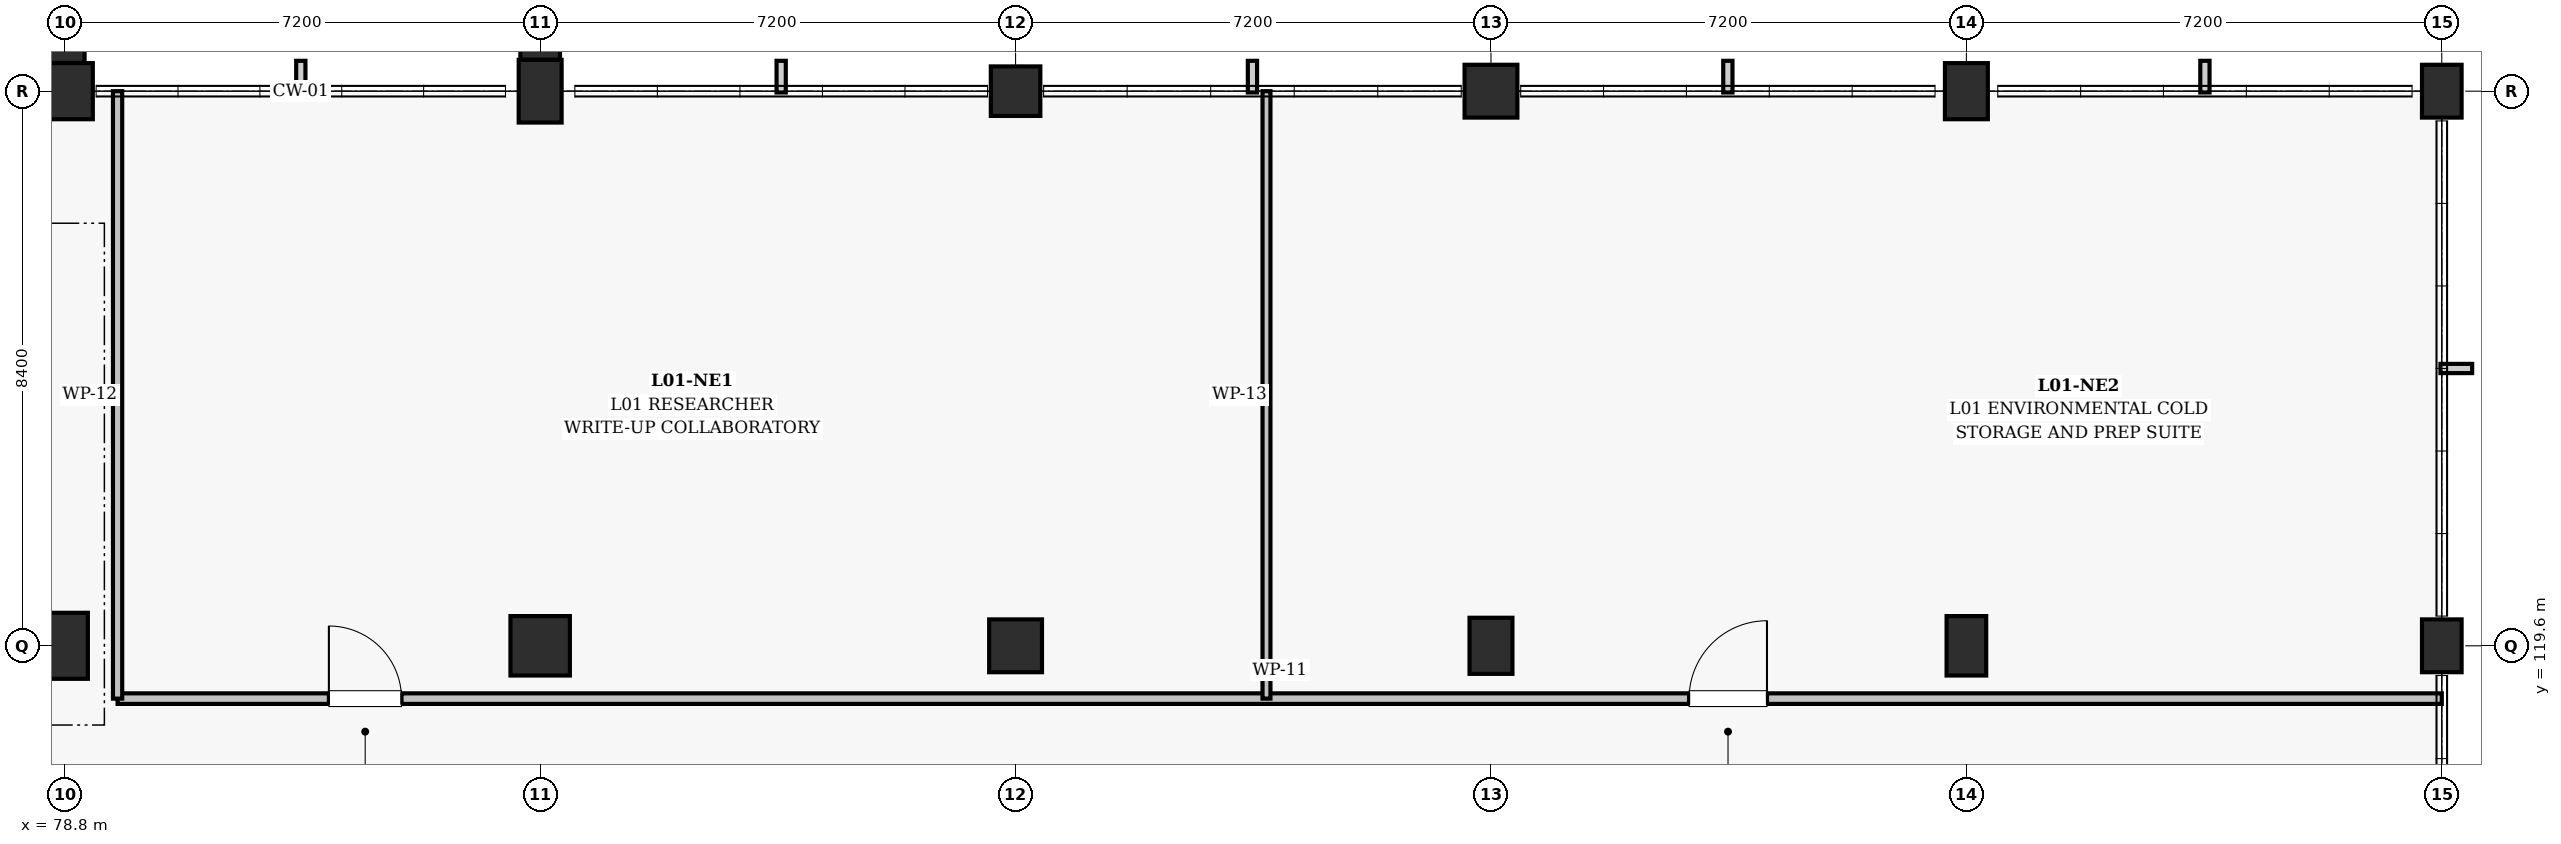
"""IFC4 building model, lengths in metres.
Left out: names, types, materials, properties, quantities, classifications, styles, units other than length and angle.
Written with IfcOpenShell. Run it as: python <this file> out.ifc"""

import sys

from ifc_helpers import new_model, si_unit, direction, frame, frame_2d, origin, origin_2d, place, context, subcontext, project, spatial, rectangle, extrude, element, fill, save


model = new_model("IFC4")
c1 = context("Model", 3, precision=1e-05, world=origin(), true_north=direction((0.0, 1.0)))
c2 = subcontext(c1, "Body", "Model", "MODEL_VIEW")
j1 = project(units=[si_unit("LENGTHUNIT", "METRE"), si_unit("PLANEANGLEUNIT", "RADIAN")], contexts=[c1])
p1 = place(None, origin())
s1 = spatial("IfcSite", under=j1, at=p1, CompositionType="ELEMENT")
p2 = place(p1, origin())
s2 = spatial("IfcBuilding", under=s1, at=p2, CompositionType="ELEMENT")
p3 = place(p2, frame((0.0, 0.0, 5.4)))
s3 = spatial("IfcBuildingStorey", under=s2, at=p3, CompositionType="ELEMENT", Elevation=5.4)
p4 = place(p3, frame((78.8, 119.6, 0.0), z_axis=(0.0, 0.0, 1.0), x_axis=(1.0, 0.0, 0.0)))
e1 = element("IfcColumn", 1, at=p4, inside=s3, PredefinedType="COLUMN", context=c2, shape_type="SweptSolid", body=[
    extrude(rectangle(XDim=0.7, YDim=1.0, at=origin_2d()), origin(), (0.0, 0.0, 1.0), 4.5),
])
p5 = place(p3, frame((78.8, 128.0, 0.0), z_axis=(0.0, 0.0, 1.0), x_axis=(1.0, 0.0, 0.0)))
e2 = element("IfcColumn", 2, at=p5, inside=s3, PredefinedType="COLUMN", context=c2, shape_type="SweptSolid", body=[
    extrude(rectangle(XDim=0.85, YDim=0.85, at=origin_2d()), origin(), (0.0, 0.0, 1.0), 4.5),
])
p6 = place(p3, frame((86.0, 119.6, 0.0), z_axis=(0.0, 0.0, 1.0), x_axis=(1.0, 0.0, 0.0)))
e3 = element("IfcColumn", 3, at=p6, inside=s3, PredefinedType="COLUMN", context=c2, shape_type="SweptSolid", body=[
    extrude(rectangle(XDim=0.9, YDim=0.9, at=origin_2d()), origin(), (0.0, 0.0, 1.0), 4.5),
])
p7 = place(p3, frame((86.0, 128.0, 0.0), z_axis=(0.0, 0.0, 1.0), x_axis=(1.0, 0.0, 0.0)))
e4 = element("IfcColumn", 4, at=p7, inside=s3, PredefinedType="COLUMN", context=c2, shape_type="SweptSolid", body=[
    extrude(rectangle(XDim=0.65, YDim=0.95, at=origin_2d()), origin(), (0.0, 0.0, 1.0), 4.5),
])
p8 = place(p3, frame((93.2, 119.6, 0.0), z_axis=(0.0, 0.0, 1.0), x_axis=(1.0, 0.0, 0.0)))
e5 = element("IfcColumn", 5, at=p8, inside=s3, PredefinedType="COLUMN", context=c2, shape_type="SweptSolid", body=[
    extrude(rectangle(XDim=0.8, YDim=0.8, at=origin_2d()), origin(), (0.0, 0.0, 1.0), 4.5),
])
p9 = place(p3, frame((93.2, 128.0, 0.0), z_axis=(0.0, 0.0, 1.0), x_axis=(1.0, 0.0, 0.0)))
e6 = element("IfcColumn", 6, at=p9, inside=s3, PredefinedType="COLUMN", context=c2, shape_type="SweptSolid", body=[
    extrude(rectangle(XDim=0.75, YDim=0.75, at=origin_2d()), origin(), (0.0, 0.0, 1.0), 4.5),
])
p10 = place(p3, frame((100.4, 119.6, 0.0), z_axis=(0.0, 0.0, 1.0), x_axis=(1.0, 0.0, 0.0)))
e7 = element("IfcColumn", 7, at=p10, inside=s3, PredefinedType="COLUMN", context=c2, shape_type="SweptSolid", body=[
    extrude(rectangle(XDim=0.65, YDim=0.85, at=origin_2d()), origin(), (0.0, 0.0, 1.0), 4.5),
])
p11 = place(p3, frame((100.4, 128.0, 0.0), z_axis=(0.0, 0.0, 1.0), x_axis=(1.0, 0.0, 0.0)))
e8 = element("IfcColumn", 8, at=p11, inside=s3, PredefinedType="COLUMN", context=c2, shape_type="SweptSolid", body=[
    extrude(rectangle(XDim=0.8, YDim=0.8, at=origin_2d()), origin(), (0.0, 0.0, 1.0), 4.5),
])
p12 = place(p3, frame((107.6, 119.6, 0.0), z_axis=(0.0, 0.0, 1.0), x_axis=(1.0, 0.0, 0.0)))
e9 = element("IfcColumn", 9, at=p12, inside=s3, PredefinedType="COLUMN", context=c2, shape_type="SweptSolid", body=[
    extrude(rectangle(XDim=0.6, YDim=0.9, at=origin_2d()), origin(), (0.0, 0.0, 1.0), 4.5),
])
p13 = place(p3, frame((107.6, 128.0, 0.0), z_axis=(0.0, 0.0, 1.0), x_axis=(1.0, 0.0, 0.0)))
e10 = element("IfcColumn", 10, at=p13, inside=s3, PredefinedType="COLUMN", context=c2, shape_type="SweptSolid", body=[
    extrude(rectangle(XDim=0.65, YDim=0.85, at=origin_2d()), origin(), (0.0, 0.0, 1.0), 4.5),
])
for number, where, z_axis, x_axis in (
    (11, (114.8, 119.6, 0.0), (0.0, 0.0, 1.0), (1.0, 0.0, 0.0)),
    (12, (114.8, 128.0, 0.0), (0.0, 0.0, 1.0), (1.0, 0.0, 0.0)),
):
    element("IfcColumn", number, at=place(p3, frame(where, z_axis=z_axis, x_axis=x_axis)), inside=s3, PredefinedType="COLUMN", context=c2, shape_type="SweptSolid", body=[
        extrude(rectangle(XDim=0.6, YDim=0.8, at=origin_2d()), origin(), (0.0, 0.0, 1.0), 4.5),
    ])
for number, where, z_axis, x_axis in (
    (13, (78.8, 128.853, 0.0), (0.0, 0.0, 1.0), (1.0, 0.0, 0.0)),
    (14, (86.0, 128.903, 0.0), (0.0, 0.0, 1.0), (1.0, 0.0, 0.0)),
):
    element("IfcColumn", number, at=place(p3, frame(where, z_axis=z_axis, x_axis=x_axis)), inside=s3, PredefinedType="PILASTER", context=c2, shape_type="SweptSolid", body=[
        extrude(rectangle(XDim=0.6, YDim=0.85, at=origin_2d()), origin(), (0.0, 0.0, 1.0), 4.5),
    ])
p14 = place(p3, frame((79.6, 118.8, 0.0), z_axis=(0.0, 0.0, 1.0), x_axis=(1.0, 0.0, 0.0)))
e15 = element("IfcWall", 15, at=p14, inside=s3, PredefinedType="PARTITIONING", context=c2, shape_type="SweptSolid", body=[
    extrude(rectangle(XDim=35.2, YDim=0.16, at=frame_2d((17.6, 0.0))), origin(), (0.0, 0.0, 1.0), 2.96),
])
p15 = place(p14, frame((3.2, 0.0, 0.0)))
e16 = element("IfcOpeningElement", 16, at=p15, cuts=e15, PredefinedType="OPENING", context=c2, shape_type="SweptSolid", body=[
    extrude(rectangle(XDim=1.1, YDim=2.15, at=frame_2d((0.55, 1.075))), frame((0.0, 0.09, 0.0), z_axis=(0.0, -1.0, 0.0), x_axis=(1.0, 0.0, 0.0)), (0.0, 0.0, 1.0), 0.18),
])
p16 = place(p14, frame((23.8, 0.0, 0.0)))
e17 = element("IfcOpeningElement", 17, at=p16, cuts=e15, PredefinedType="OPENING", context=c2, shape_type="SweptSolid", body=[
    extrude(rectangle(XDim=1.18, YDim=2.2, at=frame_2d((0.59, 1.1))), frame((0.0, 0.09, 0.0), z_axis=(0.0, -1.0, 0.0), x_axis=(1.0, 0.0, 0.0)), (0.0, 0.0, 1.0), 0.18),
])
p17 = place(p3, frame((79.6, 118.8, 0.0), z_axis=(0.0, 0.0, 1.0), x_axis=(0.0, 1.0, 0.0)))
e18 = element("IfcWall", 18, at=p17, inside=s3, PredefinedType="PARTITIONING", context=c2, shape_type="SweptSolid", body=[
    extrude(rectangle(XDim=9.2, YDim=0.14, at=frame_2d((4.6, 0.0))), origin(), (0.0, 0.0, 1.0), 3.51),
])
p18 = place(p3, frame((97.0, 118.8, 0.0), z_axis=(0.0, 0.0, 1.0), x_axis=(0.0, 1.0, 0.0)))
e19 = element("IfcWall", 19, at=p18, inside=s3, PredefinedType="PARTITIONING", context=c2, shape_type="SweptSolid", body=[
    extrude(rectangle(XDim=9.2, YDim=0.12, at=frame_2d((4.6, 0.0))), origin(), (0.0, 0.0, 1.0), 3.36),
])
p19 = place(p15, origin())
e20 = element("IfcDoor", 20, at=p19, inside=s3, OperationType="SINGLE_SWING_LEFT", PredefinedType="DOOR", context=c2, shape_type="SweptSolid", body=[
    extrude(rectangle(XDim=1.1, YDim=2.15, at=frame_2d((0.55, 1.075))), frame((0.0, 0.025, 0.0), z_axis=(0.0, -1.0, 0.0), x_axis=(1.0, 0.0, 0.0)), (0.0, 0.0, 1.0), 0.05),
])
fill(e16, e20)
p20 = place(p16, origin())
e21 = element("IfcDoor", 21, at=p20, inside=s3, OperationType="SINGLE_SWING_RIGHT", PredefinedType="DOOR", context=c2, shape_type="SweptSolid", body=[
    extrude(rectangle(XDim=1.18, YDim=2.2, at=frame_2d((0.59, 1.1))), frame((0.0, 0.025, 0.0), z_axis=(0.0, -1.0, 0.0), x_axis=(1.0, 0.0, 0.0)), (0.0, 0.0, 1.0), 0.05),
])
fill(e17, e21)
save(model, sys.argv[1])
